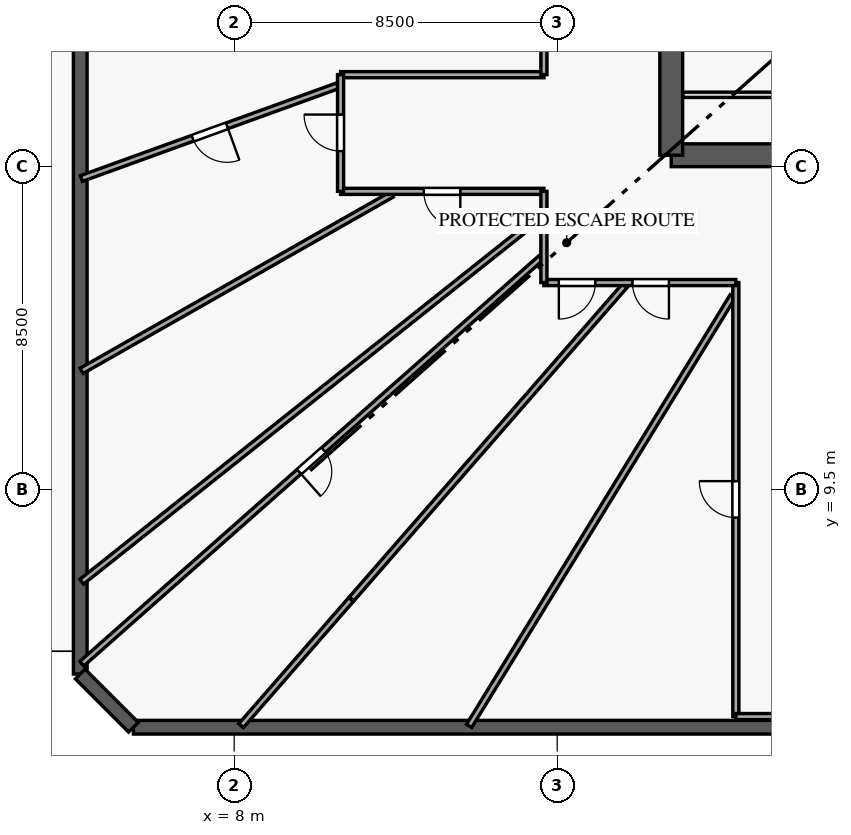
"""IFC4 building model, lengths in metres.
Left out: names, types, materials, properties, quantities, classifications, styles, units other than length and angle.
Written with IfcOpenShell. Run it as: python <this file> out.ifc"""

import sys

from ifc_helpers import new_model, si_unit, direction, frame, frame_2d, origin, origin_with_axes, origin_2d, place, context, subcontext, project, spatial, rectangle, circle, extrude, source, transform, mapped, element, fill, save


model = new_model("IFC4")
c1 = context("Model", 3, precision=1e-05, world=origin(), true_north=direction((0.0, 1.0)))
c2 = subcontext(c1, "Body", "Model", "MODEL_VIEW")
j1 = project(units=[si_unit("LENGTHUNIT", "METRE"), si_unit("PLANEANGLEUNIT", "RADIAN")], contexts=[c1])
p1 = place(None, origin())
s1 = spatial("IfcSite", under=j1, at=p1, CompositionType="ELEMENT")
p2 = place(p1, origin())
s2 = spatial("IfcBuilding", under=s1, at=p2, CompositionType="ELEMENT")
p3 = place(p2, frame((0.0, 0.0, 9.0)))
s3 = spatial("IfcBuildingStorey", under=s2, at=p3, CompositionType="ELEMENT", Elevation=9.0)
p4 = place(p3, frame((19.5, 18.3, 0.0), z_axis=(0.0, 0.0, 1.0), x_axis=(1.0, 0.0, 0.0)))
e1 = element("IfcWall", 1, at=p4, inside=s3, PredefinedType="SHEAR", context=c2, shape_type="SweptSolid", body=[
    extrude(rectangle(XDim=7.05, YDim=0.6, at=frame_2d((3.525, 0.0))), origin(), (0.0, 0.0, 1.0), 4.2),
])
p5 = place(p4, frame((4.2, 0.0, 0.0)))
e2 = element("IfcOpeningElement", 2, at=p5, cuts=e1, PredefinedType="OPENING", context=c2, shape_type="SweptSolid", body=[
    extrude(rectangle(XDim=1.4, YDim=2.2, at=frame_2d((0.7, 1.1))), frame((0.0, 0.31, 0.0), z_axis=(0.0, -1.0, 0.0), x_axis=(1.0, 0.0, 0.0)), (0.0, 0.0, 1.0), 0.62),
])
p6 = place(p3, frame((19.5, 34.7, 0.0), z_axis=(0.0, 0.0, 1.0), x_axis=(0.0, -1.0, 0.0)))
e3 = element("IfcWall", 3, at=p6, inside=s3, PredefinedType="SHEAR", context=c2, shape_type="SweptSolid", body=[
    extrude(rectangle(XDim=16.4, YDim=0.6, at=frame_2d((8.2, 0.0))), origin(), (0.0, 0.0, 1.0), 4.2),
])
p7 = place(p6, frame((3.1, 0.0, 0.0)))
e4 = element("IfcOpeningElement", 4, at=p7, cuts=e3, PredefinedType="OPENING", context=c2, shape_type="SweptSolid", body=[
    extrude(rectangle(XDim=1.1, YDim=2.15, at=frame_2d((0.55, 1.075))), frame((0.0, 0.31, 0.0), z_axis=(0.0, -1.0, 0.0), x_axis=(1.0, 0.0, 0.0)), (0.0, 0.0, 1.0), 0.62),
])
m1 = source(origin_with_axes(), c2, "Body", "SweptSolid", [
    extrude(circle(Radius=0.9, at=origin_2d()), origin(), (0.0, 0.0, 1.0), 4.5),
])
p8 = place(p3, frame((19.5, 18.3, 0.0), z_axis=(0.0, 0.0, 1.0), x_axis=(1.0, 0.0, 0.0)))
e5 = element("IfcColumn", 5, at=p8, inside=s3, PredefinedType="COLUMN", context=c2, shape_type="MappedRepresentation", body=[
    mapped(m1, transform((0.0, 0.0, 0.0), scale=1.0)),
])
m2 = source(origin_with_axes(), c2, "Body", "SweptSolid", [
    extrude(circle(Radius=0.8, at=origin_2d()), origin(), (0.0, 0.0, 1.0), 4.5),
])
p9 = place(p3, frame((10.2, 7.5, 0.0), z_axis=(0.0, 0.0, 1.0), x_axis=(1.0, 0.0, 0.0)))
e6 = element("IfcColumn", 6, at=p9, inside=s3, PredefinedType="COLUMN", context=c2, shape_type="MappedRepresentation", body=[
    mapped(m2, transform((0.0, 0.0, 0.0), scale=1.0)),
])
p10 = place(p3, frame((5.35, 3.25, 0.0), z_axis=(0.0, 0.0, 1.0), x_axis=(1.0, 0.0, 0.0)))
e7 = element("IfcWall", 7, at=p10, inside=s3, PredefinedType="SOLIDWALL", context=c2, shape_type="SweptSolid", body=[
    extrude(rectangle(XDim=49.25, YDim=0.36, at=frame_2d((24.625, 0.0))), origin(), (0.0, 0.0, 1.0), 4.2),
])
p11 = place(p10, frame((4.952, 0.0, 0.85)))
e8 = element("IfcOpeningElement", 8, at=p11, cuts=e7, PredefinedType="OPENING", context=c2, shape_type="SweptSolid", body=[
    extrude(rectangle(XDim=1.8, YDim=2.2, at=frame_2d((0.9, 1.1))), frame((0.0, 0.19, 0.0), z_axis=(0.0, -1.0, 0.0), x_axis=(1.0, 0.0, 0.0)), (0.0, 0.0, 1.0), 0.38),
])
p12 = place(p10, frame((11.45, 0.0, 0.85)))
e9 = element("IfcOpeningElement", 9, at=p12, cuts=e7, PredefinedType="OPENING", context=c2, shape_type="SweptSolid", body=[
    extrude(rectangle(XDim=1.8, YDim=2.2, at=frame_2d((0.9, 1.1))), frame((0.0, 0.19, 0.0), z_axis=(0.0, -1.0, 0.0), x_axis=(1.0, 0.0, 0.0)), (0.0, 0.0, 1.0), 0.38),
])
p13 = place(p10, frame((17.05, 0.0, 0.85)))
e10 = element("IfcOpeningElement", 10, at=p13, cuts=e7, PredefinedType="OPENING", context=c2, shape_type="SweptSolid", body=[
    extrude(rectangle(XDim=1.8, YDim=2.2, at=frame_2d((0.9, 1.1))), frame((0.0, 0.19, 0.0), z_axis=(0.0, -1.0, 0.0), x_axis=(1.0, 0.0, 0.0)), (0.0, 0.0, 1.0), 0.38),
])
p14 = place(p10, frame((23.505, 0.0, 0.85)))
e11 = element("IfcOpeningElement", 11, at=p14, cuts=e7, PredefinedType="OPENING", context=c2, shape_type="SweptSolid", body=[
    extrude(rectangle(XDim=1.8, YDim=2.2, at=frame_2d((0.9, 1.1))), frame((0.0, 0.19, 0.0), z_axis=(0.0, -1.0, 0.0), x_axis=(1.0, 0.0, 0.0)), (0.0, 0.0, 1.0), 0.38),
])
p15 = place(p10, frame((29.567, 0.0, 0.85)))
e12 = element("IfcOpeningElement", 12, at=p15, cuts=e7, PredefinedType="OPENING", context=c2, shape_type="SweptSolid", body=[
    extrude(rectangle(XDim=1.8, YDim=2.2, at=frame_2d((0.9, 1.1))), frame((0.0, 0.19, 0.0), z_axis=(0.0, -1.0, 0.0), x_axis=(1.0, 0.0, 0.0)), (0.0, 0.0, 1.0), 0.38),
])
p16 = place(p10, frame((33.402, 0.0, 0.85)))
e13 = element("IfcOpeningElement", 13, at=p16, cuts=e7, PredefinedType="OPENING", context=c2, shape_type="SweptSolid", body=[
    extrude(rectangle(XDim=1.8, YDim=2.2, at=frame_2d((0.9, 1.1))), frame((0.0, 0.19, 0.0), z_axis=(0.0, -1.0, 0.0), x_axis=(1.0, 0.0, 0.0)), (0.0, 0.0, 1.0), 0.38),
])
p17 = place(p10, frame((37.118, 0.0, 0.85)))
e14 = element("IfcOpeningElement", 14, at=p17, cuts=e7, PredefinedType="OPENING", context=c2, shape_type="SweptSolid", body=[
    extrude(rectangle(XDim=1.8, YDim=2.2, at=frame_2d((0.9, 1.1))), frame((0.0, 0.19, 0.0), z_axis=(0.0, -1.0, 0.0), x_axis=(1.0, 0.0, 0.0)), (0.0, 0.0, 1.0), 0.38),
])
p18 = place(p10, frame((42.171, 0.0, 0.85)))
e15 = element("IfcOpeningElement", 15, at=p18, cuts=e7, PredefinedType="OPENING", context=c2, shape_type="SweptSolid", body=[
    extrude(rectangle(XDim=1.8, YDim=2.2, at=frame_2d((0.9, 1.1))), frame((0.0, 0.19, 0.0), z_axis=(0.0, -1.0, 0.0), x_axis=(1.0, 0.0, 0.0)), (0.0, 0.0, 1.0), 0.38),
])
p19 = place(p10, frame((46.742, 0.0, 0.85)))
e16 = element("IfcOpeningElement", 16, at=p19, cuts=e7, PredefinedType="OPENING", context=c2, shape_type="SweptSolid", body=[
    extrude(rectangle(XDim=1.8, YDim=2.2, at=frame_2d((0.9, 1.1))), frame((0.0, 0.19, 0.0), z_axis=(0.0, -1.0, 0.0), x_axis=(1.0, 0.0, 0.0)), (0.0, 0.0, 1.0), 0.38),
])
p20 = place(p3, frame((3.95, 48.35, 0.0), z_axis=(0.0, 0.0, 1.0), x_axis=(0.0, -1.0, 0.0)))
e17 = element("IfcWall", 17, at=p20, inside=s3, PredefinedType="SOLIDWALL", context=c2, shape_type="SweptSolid", body=[
    extrude(rectangle(XDim=43.7, YDim=0.36, at=frame_2d((21.85, 0.0))), origin(), (0.0, 0.0, 1.0), 4.2),
])
p21 = place(p20, frame((1.439, 0.0, 0.85)))
e18 = element("IfcOpeningElement", 18, at=p21, cuts=e17, PredefinedType="OPENING", context=c2, shape_type="SweptSolid", body=[
    extrude(rectangle(XDim=1.8, YDim=2.2, at=frame_2d((0.9, 1.1))), frame((0.0, 0.19, 0.0), z_axis=(0.0, -1.0, 0.0), x_axis=(1.0, 0.0, 0.0)), (0.0, 0.0, 1.0), 0.38),
])
p22 = place(p20, frame((5.669, 0.0, 0.85)))
e19 = element("IfcOpeningElement", 19, at=p22, cuts=e17, PredefinedType="OPENING", context=c2, shape_type="SweptSolid", body=[
    extrude(rectangle(XDim=1.8, YDim=2.2, at=frame_2d((0.9, 1.1))), frame((0.0, 0.19, 0.0), z_axis=(0.0, -1.0, 0.0), x_axis=(1.0, 0.0, 0.0)), (0.0, 0.0, 1.0), 0.38),
])
p23 = place(p20, frame((15.485, 0.0, 0.85)))
e20 = element("IfcOpeningElement", 20, at=p23, cuts=e17, PredefinedType="OPENING", context=c2, shape_type="SweptSolid", body=[
    extrude(rectangle(XDim=1.8, YDim=2.2, at=frame_2d((0.9, 1.1))), frame((0.0, 0.19, 0.0), z_axis=(0.0, -1.0, 0.0), x_axis=(1.0, 0.0, 0.0)), (0.0, 0.0, 1.0), 0.38),
])
p24 = place(p20, frame((20.96, 0.0, 0.85)))
e21 = element("IfcOpeningElement", 21, at=p24, cuts=e17, PredefinedType="OPENING", context=c2, shape_type="SweptSolid", body=[
    extrude(rectangle(XDim=1.8, YDim=2.2, at=frame_2d((0.9, 1.1))), frame((0.0, 0.19, 0.0), z_axis=(0.0, -1.0, 0.0), x_axis=(1.0, 0.0, 0.0)), (0.0, 0.0, 1.0), 0.38),
])
p25 = place(p20, frame((28.012, 0.0, 0.85)))
e22 = element("IfcOpeningElement", 22, at=p25, cuts=e17, PredefinedType="OPENING", context=c2, shape_type="SweptSolid", body=[
    extrude(rectangle(XDim=1.8, YDim=2.2, at=frame_2d((0.9, 1.1))), frame((0.0, 0.19, 0.0), z_axis=(0.0, -1.0, 0.0), x_axis=(1.0, 0.0, 0.0)), (0.0, 0.0, 1.0), 0.38),
])
p26 = place(p20, frame((32.279, 0.0, 0.85)))
e23 = element("IfcOpeningElement", 23, at=p26, cuts=e17, PredefinedType="OPENING", context=c2, shape_type="SweptSolid", body=[
    extrude(rectangle(XDim=1.8, YDim=2.2, at=frame_2d((0.9, 1.1))), frame((0.0, 0.19, 0.0), z_axis=(0.0, -1.0, 0.0), x_axis=(1.0, 0.0, 0.0)), (0.0, 0.0, 1.0), 0.38),
])
p27 = place(p20, frame((37.578, 0.0, 0.85)))
e24 = element("IfcOpeningElement", 24, at=p27, cuts=e17, PredefinedType="OPENING", context=c2, shape_type="SweptSolid", body=[
    extrude(rectangle(XDim=1.8, YDim=2.2, at=frame_2d((0.9, 1.1))), frame((0.0, 0.19, 0.0), z_axis=(0.0, -1.0, 0.0), x_axis=(1.0, 0.0, 0.0)), (0.0, 0.0, 1.0), 0.38),
])
p28 = place(p20, frame((12.221, 0.0, 0.0)))
e25 = element("IfcOpeningElement", 25, at=p28, cuts=e17, PredefinedType="OPENING", context=c2, shape_type="SweptSolid", body=[
    extrude(rectangle(XDim=1.05, YDim=2.12, at=frame_2d((0.525, 1.06))), frame((0.0, 0.19, 0.0), z_axis=(0.0, -1.0, 0.0), x_axis=(1.0, 0.0, 0.0)), (0.0, 0.0, 1.0), 0.38),
])
p29 = place(p3, frame((3.95, 4.65, 0.0), z_axis=(0.0, 0.0, 1.0), x_axis=(0.707168432242, -0.707045124756, 0.0)))
e26 = element("IfcWall", 26, at=p29, inside=s3, PredefinedType="SOLIDWALL", context=c2, shape_type="SweptSolid", body=[
    extrude(rectangle(XDim=1.98, YDim=0.36, at=frame_2d((0.99, 0.0))), origin(), (0.0, 0.0, 1.0), 4.2),
])
p30 = place(p3, frame((16.068, 15.594, 0.0), z_axis=(0.0, 0.0, 1.0), x_axis=(-0.749344293453, -0.662180587052, 0.0)))
e27 = element("IfcWall", 27, at=p30, inside=s3, PredefinedType="PARTITIONING", context=c2, shape_type="SweptSolid", body=[
    extrude(rectangle(XDim=16.117, YDim=0.16, at=frame_2d((8.058, 0.0))), origin(), (0.0, 0.0, 1.0), 4.2),
])
p31 = place(p30, frame((7.628, 0.0, 0.0)))
e28 = element("IfcOpeningElement", 28, at=p31, cuts=e27, PredefinedType="OPENING", context=c2, shape_type="SweptSolid", body=[
    extrude(rectangle(XDim=0.86, YDim=2.04, at=frame_2d((0.43, 1.02))), frame((0.0, 0.09, 0.0), z_axis=(0.0, -1.0, 0.0), x_axis=(1.0, 0.0, 0.0)), (0.0, 0.0, 1.0), 0.18),
])
p32 = place(p3, frame((16.068, 16.687, 0.0), z_axis=(0.0, 0.0, 1.0), x_axis=(-0.782592647396, -0.622534134198, 0.0)))
e29 = element("IfcWall", 29, at=p32, inside=s3, PredefinedType="PARTITIONING", context=c2, shape_type="SweptSolid", body=[
    extrude(rectangle(XDim=15.435, YDim=0.16, at=frame_2d((7.717, 0.0))), origin(), (0.0, 0.0, 1.0), 4.2),
])
p33 = place(p3, frame((21.118, 14.587, 0.0), z_axis=(0.0, 0.0, 1.0), x_axis=(-0.523082178692, -0.852282250393, 0.0)))
e30 = element("IfcWall", 30, at=p33, inside=s3, PredefinedType="PARTITIONING", context=c2, shape_type="SweptSolid", body=[
    extrude(rectangle(XDim=13.261, YDim=0.16, at=frame_2d((6.63, 0.0))), origin(), (0.0, 0.0, 1.0), 4.2),
])
p34 = place(p3, frame((21.2, 3.53, 0.0), z_axis=(0.0, 0.0, 1.0), x_axis=(0.0, 1.0, 0.0)))
e31 = element("IfcWall", 31, at=p34, inside=s3, PredefinedType="PARTITIONING", context=c2, shape_type="SweptSolid", body=[
    extrude(rectangle(XDim=11.42, YDim=0.16, at=frame_2d((5.71, 0.0))), origin(), (0.0, 0.0, 1.0), 4.2),
])
p35 = place(p34, frame((5.235, 0.0, 0.0)))
e32 = element("IfcOpeningElement", 32, at=p35, cuts=e31, PredefinedType="OPENING", context=c2, shape_type="SweptSolid", body=[
    extrude(rectangle(XDim=0.96, YDim=2.15, at=frame_2d((0.48, 1.075))), frame((0.0, 0.09, 0.0), z_axis=(0.0, -1.0, 0.0), x_axis=(1.0, 0.0, 0.0)), (0.0, 0.0, 1.0), 0.18),
])
p36 = place(p3, frame((18.277, 14.868, 0.0), z_axis=(0.0, 0.0, 1.0), x_axis=(-0.657226588959, -0.753693048108, 0.0)))
e33 = element("IfcWall", 33, at=p36, inside=s3, PredefinedType="PARTITIONING", context=c2, shape_type="SweptSolid", body=[
    extrude(rectangle(XDim=10.936, YDim=0.16, at=frame_2d((5.468, 0.0))), origin(), (0.0, 0.0, 1.0), 4.2),
])
p37 = place(p3, frame((12.146, 17.268, 0.0), z_axis=(0.0, 0.0, 1.0), x_axis=(-0.869250906181, -0.494371178472, 0.0)))
e34 = element("IfcWall", 34, at=p37, inside=s3, PredefinedType="PARTITIONING", context=c2, shape_type="SweptSolid", body=[
    extrude(rectangle(XDim=9.39, YDim=0.16, at=frame_2d((4.695, 0.0))), origin(), (0.0, 0.0, 1.0), 4.2),
])
p38 = place(p3, frame((10.718, 20.126, 0.0), z_axis=(0.0, 0.0, 1.0), x_axis=(-0.940278821487, -0.340405255339, 0.0)))
e35 = element("IfcWall", 35, at=p38, inside=s3, PredefinedType="PARTITIONING", context=c2, shape_type="SweptSolid", body=[
    extrude(rectangle(XDim=7.167, YDim=0.16, at=frame_2d((3.583, 0.0))), origin(), (0.0, 0.0, 1.0), 4.2),
])
p39 = place(p38, frame((3.091, 0.0, 0.0)))
e36 = element("IfcOpeningElement", 36, at=p39, cuts=e35, PredefinedType="OPENING", context=c2, shape_type="SweptSolid", body=[
    extrude(rectangle(XDim=0.96, YDim=2.15, at=frame_2d((0.48, 1.075))), frame((0.0, 0.09, 0.0), z_axis=(0.0, -1.0, 0.0), x_axis=(1.0, 0.0, 0.0)), (0.0, 0.0, 1.0), 0.18),
])
p40 = place(p3, frame((16.15, 17.35, 0.0), z_axis=(0.0, 0.0, 1.0), x_axis=(-1.0, 0.0, 0.0)))
e37 = element("IfcWall", 37, at=p40, inside=s3, PredefinedType="PARTITIONING", context=c2, shape_type="SweptSolid", body=[
    extrude(rectangle(XDim=5.35, YDim=0.16, at=frame_2d((2.675, 0.0))), origin(), (0.0, 0.0, 1.0), 4.2),
])
p41 = place(p40, frame((2.2, 0.0, 0.0)))
e38 = element("IfcOpeningElement", 38, at=p41, cuts=e37, PredefinedType="OPENING", context=c2, shape_type="SweptSolid", body=[
    extrude(rectangle(XDim=0.96, YDim=2.15, at=frame_2d((0.48, 1.075))), frame((0.0, 0.09, 0.0), z_axis=(0.0, -1.0, 0.0), x_axis=(1.0, 0.0, 0.0)), (0.0, 0.0, 1.0), 0.18),
])
p42 = place(p3, frame((10.8, 20.42, 0.0), z_axis=(0.0, 0.0, 1.0), x_axis=(1.0, 0.0, 0.0)))
e39 = element("IfcWall", 39, at=p42, inside=s3, PredefinedType="PARTITIONING", context=c2, shape_type="SweptSolid", body=[
    extrude(rectangle(XDim=5.35, YDim=0.16, at=frame_2d((2.675, 0.0))), origin(), (0.0, 0.0, 1.0), 3.25),
])
p43 = place(p3, frame((21.2, 14.95, 0.0), z_axis=(0.0, 0.0, 1.0), x_axis=(-1.0, 0.0, 0.0)))
e40 = element("IfcWall", 40, at=p43, inside=s3, PredefinedType="PARTITIONING", context=c2, shape_type="SweptSolid", body=[
    extrude(rectangle(XDim=5.05, YDim=0.16, at=frame_2d((2.525, 0.0))), origin(), (0.0, 0.0, 1.0), 4.2),
])
p44 = place(p43, frame((3.698, 0.0, 0.0)))
e41 = element("IfcOpeningElement", 41, at=p44, cuts=e40, PredefinedType="OPENING", context=c2, shape_type="SweptSolid", body=[
    extrude(rectangle(XDim=0.96, YDim=2.15, at=frame_2d((0.48, 1.075))), frame((0.0, 0.09, 0.0), z_axis=(0.0, -1.0, 0.0), x_axis=(1.0, 0.0, 0.0)), (0.0, 0.0, 1.0), 0.18),
])
p45 = place(p43, frame((1.76, 0.0, 0.0)))
e42 = element("IfcOpeningElement", 42, at=p45, cuts=e40, PredefinedType="OPENING", context=c2, shape_type="SweptSolid", body=[
    extrude(rectangle(XDim=0.96, YDim=2.15, at=frame_2d((0.48, 1.075))), frame((0.0, 0.09, 0.0), z_axis=(0.0, -1.0, 0.0), x_axis=(1.0, 0.0, 0.0)), (0.0, 0.0, 1.0), 0.18),
])
p46 = place(p3, frame((11.076, 6.61, 0.0), z_axis=(0.0, 0.0, 1.0), x_axis=(-0.657196582962, -0.753719212534, 0.0)))
e43 = element("IfcWall", 43, at=p46, inside=s3, PredefinedType="PARTITIONING", context=c2, shape_type="SweptSolid", body=[
    extrude(rectangle(XDim=4.404, YDim=0.16, at=frame_2d((2.202, 0.0))), origin(), (0.0, 0.0, 1.0), 4.2),
])
p47 = place(p3, frame((25.4, 3.53, 0.0), z_axis=(0.0, 0.0, 1.0), x_axis=(-1.0, 0.0, 0.0)))
e44 = element("IfcWall", 44, at=p47, inside=s3, PredefinedType="PARTITIONING", context=c2, shape_type="SweptSolid", body=[
    extrude(rectangle(XDim=4.2, YDim=0.16, at=frame_2d((2.1, 0.0))), origin(), (0.0, 0.0, 1.0), 4.2),
])
p48 = place(p3, frame((19.807, 19.89, 0.0), z_axis=(0.0, 0.0, 1.0), x_axis=(1.0, 0.0, 0.0)))
e45 = element("IfcWall", 45, at=p48, inside=s3, PredefinedType="PARTITIONING", context=c2, shape_type="SweptSolid", body=[
    extrude(rectangle(XDim=3.689, YDim=0.14, at=frame_2d((1.844, 0.0))), origin(), (0.0, 0.0, 1.0), 4.2),
])
p49 = place(p3, frame((10.8, 17.35, 0.0), z_axis=(0.0, 0.0, 1.0), x_axis=(0.0, 1.0, 0.0)))
e46 = element("IfcWall", 46, at=p49, inside=s3, PredefinedType="PARTITIONING", context=c2, shape_type="SweptSolid", body=[
    extrude(rectangle(XDim=3.07, YDim=0.16, at=frame_2d((1.535, 0.0))), origin(), (0.0, 0.0, 1.0), 3.25),
])
p50 = place(p49, frame((1.06, 0.0, 0.0)))
e47 = element("IfcOpeningElement", 47, at=p50, cuts=e46, PredefinedType="OPENING", context=c2, shape_type="SweptSolid", body=[
    extrude(rectangle(XDim=0.96, YDim=2.15, at=frame_2d((0.48, 1.075))), frame((0.0, 0.09, 0.0), z_axis=(0.0, -1.0, 0.0), x_axis=(1.0, 0.0, 0.0)), (0.0, 0.0, 1.0), 0.18),
])
p51 = place(p3, frame((16.15, 14.95, 0.0), z_axis=(0.0, 0.0, 1.0), x_axis=(0.0, 1.0, 0.0)))
e48 = element("IfcWall", 48, at=p51, inside=s3, PredefinedType="PARTITIONING", context=c2, shape_type="SweptSolid", body=[
    extrude(rectangle(XDim=2.4, YDim=0.16, at=frame_2d((1.2, 0.0))), origin(), (0.0, 0.0, 1.0), 3.25),
])
p52 = place(p3, frame((16.15, 20.42, 0.0), z_axis=(0.0, 0.0, 1.0), x_axis=(0.0, 1.0, 0.0)))
e49 = element("IfcWall", 49, at=p52, inside=s3, PredefinedType="PARTITIONING", context=c2, shape_type="SweptSolid", body=[
    extrude(rectangle(XDim=1.518, YDim=0.16, at=frame_2d((0.759, 0.0))), origin(), (0.0, 0.0, 1.0), 4.2),
])
m3 = source(origin_with_axes(), c2, "Body", "SweptSolid", [
    extrude(rectangle(XDim=1.8, YDim=2.2, at=frame_2d((0.9, 1.1))), frame((0.0, 0.03, 0.0), z_axis=(0.0, -1.0, 0.0), x_axis=(1.0, 0.0, 0.0)), (0.0, 0.0, 1.0), 0.06),
])
p53 = place(p11, origin())
e50 = element("IfcWindow", 50, at=p53, inside=s3, PartitioningType="SINGLE_PANEL", PredefinedType="WINDOW", context=c2, shape_type="MappedRepresentation", body=[
    mapped(m3, transform((0.0, 0.0, 0.0), scale=1.0)),
])
fill(e8, e50)
p54 = place(p12, origin())
e51 = element("IfcWindow", 51, at=p54, inside=s3, PartitioningType="SINGLE_PANEL", PredefinedType="WINDOW", context=c2, shape_type="MappedRepresentation", body=[
    mapped(m3, transform((0.0, 0.0, 0.0), scale=1.0)),
])
fill(e9, e51)
p55 = place(p25, origin())
e52 = element("IfcWindow", 52, at=p55, inside=s3, PartitioningType="SINGLE_PANEL", PredefinedType="WINDOW", context=c2, shape_type="MappedRepresentation", body=[
    mapped(m3, transform((0.0, 0.0, 0.0), scale=1.0)),
])
fill(e22, e52)
p56 = place(p26, origin())
e53 = element("IfcWindow", 53, at=p56, inside=s3, PartitioningType="SINGLE_PANEL", PredefinedType="WINDOW", context=c2, shape_type="MappedRepresentation", body=[
    mapped(m3, transform((0.0, 0.0, 0.0), scale=1.0)),
])
fill(e23, e53)
p57 = place(p27, origin())
e54 = element("IfcWindow", 54, at=p57, inside=s3, PartitioningType="SINGLE_PANEL", PredefinedType="WINDOW", context=c2, shape_type="MappedRepresentation", body=[
    mapped(m3, transform((0.0, 0.0, 0.0), scale=1.0)),
])
fill(e24, e54)
m4 = source(origin_with_axes(), c2, "Body", "SweptSolid", [
    extrude(rectangle(XDim=0.96, YDim=2.15, at=frame_2d((0.48, 1.075))), frame((0.0, 0.025, 0.0), z_axis=(0.0, -1.0, 0.0), x_axis=(1.0, 0.0, 0.0)), (0.0, 0.0, 1.0), 0.05),
])
p58 = place(p39, origin())
e55 = element("IfcDoor", 55, at=p58, inside=s3, OperationType="SINGLE_SWING_LEFT", PredefinedType="DOOR", context=c2, shape_type="MappedRepresentation", body=[
    mapped(m4, transform((0.0, 0.0, 0.0), scale=1.0)),
])
fill(e36, e55)
p59 = place(p50, origin())
e56 = element("IfcDoor", 56, at=p59, inside=s3, OperationType="SINGLE_SWING_RIGHT", PredefinedType="DOOR", context=c2, shape_type="MappedRepresentation", body=[
    mapped(m4, transform((0.0, 0.0, 0.0), scale=1.0)),
])
fill(e47, e56)
p60 = place(p41, origin())
e57 = element("IfcDoor", 57, at=p60, inside=s3, OperationType="SINGLE_SWING_LEFT", PredefinedType="DOOR", context=c2, shape_type="MappedRepresentation", body=[
    mapped(m4, transform((0.0, 0.0, 0.0), scale=1.0)),
])
fill(e38, e57)
p61 = place(p44, origin())
e58 = element("IfcDoor", 58, at=p61, inside=s3, OperationType="SINGLE_SWING_RIGHT", PredefinedType="DOOR", context=c2, shape_type="MappedRepresentation", body=[
    mapped(m4, transform((0.0, 0.0, 0.0), scale=1.0)),
])
fill(e41, e58)
p62 = place(p45, origin())
e59 = element("IfcDoor", 59, at=p62, inside=s3, OperationType="SINGLE_SWING_LEFT", PredefinedType="DOOR", context=c2, shape_type="MappedRepresentation", body=[
    mapped(m4, transform((0.0, 0.0, 0.0), scale=1.0)),
])
fill(e42, e59)
p63 = place(p35, origin())
e60 = element("IfcDoor", 60, at=p63, inside=s3, OperationType="SINGLE_SWING_RIGHT", PredefinedType="DOOR", context=c2, shape_type="MappedRepresentation", body=[
    mapped(m4, transform((0.0, 0.0, 0.0), scale=1.0)),
])
fill(e32, e60)
m5 = source(origin_with_axes(), c2, "Body", "SweptSolid", [
    extrude(rectangle(XDim=0.86, YDim=2.04, at=frame_2d((0.43, 1.02))), frame((0.0, 0.025, 0.0), z_axis=(0.0, -1.0, 0.0), x_axis=(1.0, 0.0, 0.0)), (0.0, 0.0, 1.0), 0.05),
])
p64 = place(p31, origin())
e61 = element("IfcDoor", 61, at=p64, inside=s3, OperationType="SINGLE_SWING_RIGHT", PredefinedType="DOOR", context=c2, shape_type="MappedRepresentation", body=[
    mapped(m5, transform((0.0, 0.0, 0.0), scale=1.0)),
])
fill(e28, e61)
save(model, sys.argv[1])
